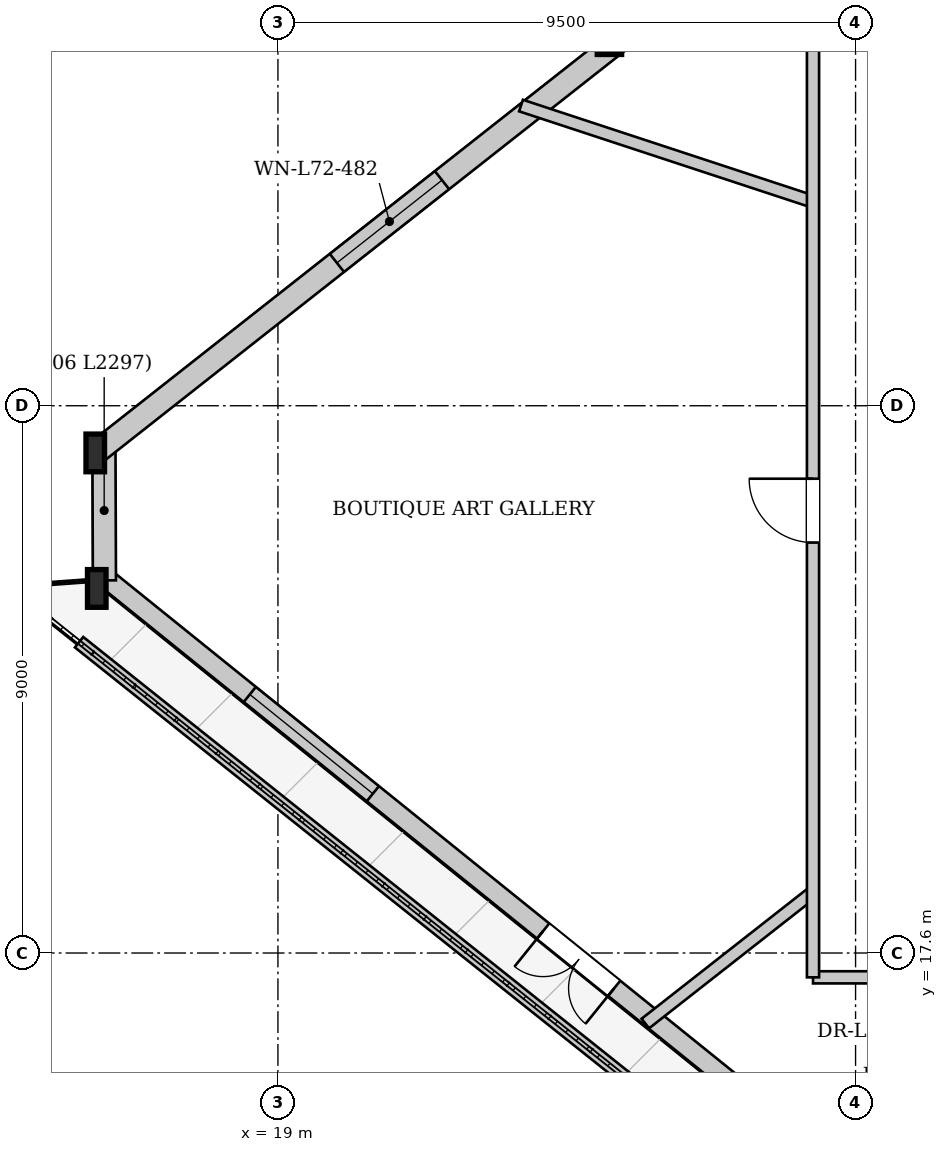
"""IFC4 building model, lengths in metres.
Left out: names, types, materials, properties, quantities, classifications, styles, units other than length and angle.
Written with IfcOpenShell. Run it as: python <this file> out.ifc"""

import sys

from ifc_helpers import new_model, si_unit, direction, frame, frame_2d, origin, origin_2d, place, context, subcontext, project, spatial, rectangle, i_section, extrude, source, transform, mapped, element, fill, save


model = new_model("IFC4")
c1 = context("Model", 3, precision=1e-05, world=origin(), true_north=direction((0.0, 1.0)))
c2 = subcontext(c1, "Body", "Model", "MODEL_VIEW")
j1 = project(units=[si_unit("LENGTHUNIT", "METRE"), si_unit("PLANEANGLEUNIT", "RADIAN")], contexts=[c1])
p1 = place(None, origin())
s1 = spatial("IfcSite", under=j1, at=p1, CompositionType="ELEMENT")
p2 = place(p1, origin())
s2 = spatial("IfcBuilding", under=s1, at=p2, CompositionType="ELEMENT")
p3 = place(p2, frame((0.0, 0.0, 270.5)))
s3 = spatial("IfcBuildingStorey", under=s2, at=p3, CompositionType="ELEMENT", Elevation=270.5)
m1 = source(origin(), c2, "Body", "SweptSolid", [
    extrude(i_section(OverallWidth=0.401, OverallDepth=0.399, WebThickness=0.022, FlangeThickness=0.034, at=origin_2d()), origin(), (0.0, 0.0, 1.0), 3.449),
])
p4 = place(p3, frame((24.463, 32.729, 0.0), z_axis=(-0.006371364078, -0.088491167751, 0.996056584211), x_axis=(0.997418034357, -0.071814098474, 0.0)))
e1 = element("IfcColumn", 1, at=p4, inside=s3, PredefinedType="COLUMN", context=c2, shape_type="MappedRepresentation", body=[
    mapped(m1, transform((0.0, 0.0, 0.0), x_axis=(1.0, 0.0, 0.0), y_axis=(0.0, 1.0, 0.0), z_axis=(0.0, 0.0, 1.0), scale=1.0)),
])
m2 = source(origin(), c2, "Body", "SweptSolid", [
    extrude(i_section(OverallWidth=0.305, OverallDepth=0.62, WebThickness=0.021, FlangeThickness=0.04, at=origin_2d()), origin(), (0.0, 0.0, 1.0), 3.459),
])
p5 = place(p3, frame((15.948, 26.024, 0.0), z_axis=(0.027310398688, -0.115663419766, 0.992912944548), x_axis=(0.973237757323, 0.229800495475, 0.0)))
e2 = element("IfcColumn", 2, at=p5, inside=s3, PredefinedType="COLUMN", context=c2, shape_type="MappedRepresentation", body=[
    mapped(m2, transform((0.0, 0.0, 0.0), x_axis=(1.0, 0.0, 0.0), y_axis=(0.0, 1.0, 0.0), z_axis=(0.0, 0.0, 1.0), scale=1.0)),
])
m3 = source(origin(), c2, "Body", "SweptSolid", [
    extrude(i_section(OverallWidth=0.305, OverallDepth=0.62, WebThickness=0.021, FlangeThickness=0.04, at=origin_2d()), origin(), (0.0, 0.0, 1.0), 3.448),
])
p6 = place(p3, frame((15.956, 23.727, 0.0), z_axis=(0.037178471964, -0.076410611903, 0.996383048637), x_axis=(0.899208505814, 0.437520357324, 0.0)))
e3 = element("IfcColumn", 3, at=p6, inside=s3, PredefinedType="COLUMN", context=c2, shape_type="MappedRepresentation", body=[
    mapped(m3, transform((0.0, 0.0, 0.0), x_axis=(1.0, 0.0, 0.0), y_axis=(0.0, 1.0, 0.0), z_axis=(0.0, 0.0, 1.0), scale=1.0)),
])
p7 = place(p3, frame((29.49, 13.021, 0.0), z_axis=(0.0, 0.0, 1.0), x_axis=(-0.778476594197, 0.627673635169, 0.0)))
e4 = element("IfcWall", 4, at=p7, inside=s3, PredefinedType="SOLIDWALL", context=c2, shape_type="SweptSolid", body=[
    extrude(rectangle(XDim=17.256, YDim=0.32, at=frame_2d((8.628, 0.0))), origin(), (0.0, 0.0, 1.0), 2.872),
])
p8 = place(p7, frame((6.372, 0.0, 0.0)))
e5 = element("IfcOpeningElement", 5, at=p8, cuts=e4, PredefinedType="OPENING", context=c2, shape_type="SweptSolid", body=[
    extrude(rectangle(XDim=1.5, YDim=2.3, at=frame_2d((0.75, 1.15))), frame((0.0, 0.17, 0.0), z_axis=(0.0, -1.0, 0.0), x_axis=(1.0, 0.0, 0.0)), (0.0, 0.0, 1.0), 0.34),
])
p9 = place(p7, frame((11.47, 0.0, 0.402)))
e6 = element("IfcOpeningElement", 6, at=p9, cuts=e4, PredefinedType="OPENING", context=c2, shape_type="SweptSolid", body=[
    extrude(rectangle(XDim=2.6, YDim=2.35, at=frame_2d((1.3, 1.175))), frame((0.0, 0.17, 0.0), z_axis=(0.0, -1.0, 0.0), x_axis=(1.0, 0.0, 0.0)), (0.0, 0.0, 1.0), 0.34),
])
p10 = place(p3, frame((16.146, 23.728, 0.0), z_axis=(0.0, 0.0, 1.0), x_axis=(-0.003507631483, 0.999993848242, 0.0)))
e7 = element("IfcWall", 7, at=p10, inside=s3, PredefinedType="SOLIDWALL", context=c2, shape_type="SweptSolid", body=[
    extrude(rectangle(XDim=2.297, YDim=0.38, at=frame_2d((1.148, 0.0))), origin(), (0.0, 0.0, 1.0), 2.872),
])
p11 = place(p3, frame((16.066, 25.875, 0.0), z_axis=(0.0, 0.0, 1.0), x_axis=(0.785693730349, 0.61861568206, 0.0)))
e8 = element("IfcWall", 8, at=p11, inside=s3, PredefinedType="SOLIDWALL", context=c2, shape_type="SweptSolid", body=[
    extrude(rectangle(XDim=21.675, YDim=0.38, at=frame_2d((10.837, 0.0))), origin(), (0.0, 0.0, 1.0), 2.872),
])
p12 = place(p11, frame((4.969, 0.0, 0.502)))
e9 = element("IfcOpeningElement", 9, at=p12, cuts=e8, PredefinedType="OPENING", context=c2, shape_type="SweptSolid", body=[
    extrude(rectangle(XDim=2.2, YDim=2.25, at=frame_2d((1.1, 1.125))), frame((0.0, 0.2, 0.0), z_axis=(0.0, -1.0, 0.0), x_axis=(1.0, 0.0, 0.0)), (0.0, 0.0, 1.0), 0.4),
])
p13 = place(p11, frame((17.506, 0.0, 0.502)))
e10 = element("IfcOpeningElement", 10, at=p13, cuts=e8, PredefinedType="OPENING", context=c2, shape_type="SweptSolid", body=[
    extrude(rectangle(XDim=2.2, YDim=2.25, at=frame_2d((1.1, 1.125))), frame((0.0, 0.2, 0.0), z_axis=(0.0, -1.0, 0.0), x_axis=(1.0, 0.0, 0.0)), (0.0, 0.0, 1.0), 0.4),
])
p14 = place(p3, frame((15.729, 22.711, 0.0), z_axis=(0.0, 0.0, 1.0), x_axis=(0.781937578539, -0.623356738368, 0.0)))
e11 = element("IfcWall", 11, at=p14, inside=s3, PredefinedType="PARAPET", context=c2, shape_type="SweptSolid", body=[
    extrude(rectangle(XDim=15.428, YDim=0.22, at=frame_2d((7.714, 0.0))), origin(), (0.0, 0.0, 1.0), 0.3),
])
p15 = place(p3, frame((27.8, 29.956, 0.0), z_axis=(0.0, 0.0, 1.0), x_axis=(-0.949893157057, 0.312574775336, 0.0)))
e12 = element("IfcWall", 12, at=p15, inside=s3, PredefinedType="PARTITIONING", context=c2, shape_type="SweptSolid", body=[
    extrude(rectangle(XDim=5.056, YDim=0.2, at=frame_2d((2.528, 0.0))), origin(), (0.0, 0.0, 1.0), 3.38),
])
p16 = place(p3, frame((27.8, 18.603, 0.0), z_axis=(0.0, 0.0, 1.0), x_axis=(-0.786941631294, -0.617027445854, 0.0)))
e13 = element("IfcWall", 13, at=p16, inside=s3, PredefinedType="PARTITIONING", context=c2, shape_type="SweptSolid", body=[
    extrude(rectangle(XDim=3.504, YDim=0.2, at=frame_2d((1.752, 0.0))), origin(), (0.0, 0.0, 1.0), 3.38),
])
p17 = place(p3, frame((27.8, 17.2, 0.0), z_axis=(0.0, 0.0, 1.0), x_axis=(1.0, 0.0, 0.0)))
e14 = element("IfcWall", 14, at=p17, inside=s3, PredefinedType="PARTITIONING", context=c2, shape_type="SweptSolid", body=[
    extrude(rectangle(XDim=20.4, YDim=0.2, at=frame_2d((10.2, 0.0))), origin(), (0.0, 0.0, 1.0), 3.38),
])
p18 = place(p17, frame((14.378, 0.0, 0.0)))
e15 = element("IfcOpeningElement", 15, at=p18, cuts=e14, PredefinedType="OPENING", context=c2, shape_type="SweptSolid", body=[
    extrude(rectangle(XDim=1.05, YDim=2.2, at=frame_2d((0.525, 1.1))), frame((0.0, 0.11, 0.0), z_axis=(0.0, -1.0, 0.0), x_axis=(1.0, 0.0, 0.0)), (0.0, 0.0, 1.0), 0.22),
])
p19 = place(p17, frame((19.05, 0.0, 0.0)))
e16 = element("IfcOpeningElement", 16, at=p19, cuts=e14, PredefinedType="OPENING", context=c2, shape_type="SweptSolid", body=[
    extrude(rectangle(XDim=1.05, YDim=2.2, at=frame_2d((0.525, 1.1))), frame((0.0, 0.11, 0.0), z_axis=(0.0, -1.0, 0.0), x_axis=(1.0, 0.0, 0.0)), (0.0, 0.0, 1.0), 0.22),
])
p20 = place(p17, frame((1.241, 0.0, 0.0)))
e17 = element("IfcOpeningElement", 17, at=p20, cuts=e14, PredefinedType="OPENING", context=c2, shape_type="SweptSolid", body=[
    extrude(rectangle(XDim=1.05, YDim=2.2, at=frame_2d((0.525, 1.1))), frame((0.0, 0.11, 0.0), z_axis=(0.0, -1.0, 0.0), x_axis=(1.0, 0.0, 0.0)), (0.0, 0.0, 1.0), 0.22),
])
p21 = place(p3, frame((27.8, 17.2, 0.0), z_axis=(0.0, 0.0, 1.0), x_axis=(0.0, 1.0, 0.0)))
e18 = element("IfcWall", 18, at=p21, inside=s3, PredefinedType="PARTITIONING", context=c2, shape_type="SweptSolid", body=[
    extrude(rectangle(XDim=18.118, YDim=0.2, at=frame_2d((9.059, 0.0))), origin(), (0.0, 0.0, 1.0), 3.38),
])
p22 = place(p21, frame((7.15, 0.0, 0.0)))
e19 = element("IfcOpeningElement", 19, at=p22, cuts=e18, PredefinedType="OPENING", context=c2, shape_type="SweptSolid", body=[
    extrude(rectangle(XDim=1.05, YDim=2.2, at=frame_2d((0.525, 1.1))), frame((0.0, 0.11, 0.0), z_axis=(0.0, -1.0, 0.0), x_axis=(1.0, 0.0, 0.0)), (0.0, 0.0, 1.0), 0.22),
])
m4 = source(origin(), c2, "Body", "SweptSolid", [
    extrude(rectangle(XDim=1.5, YDim=2.3, at=frame_2d((0.75, 1.15))), frame((0.0, 0.025, 0.0), z_axis=(0.0, -1.0, 0.0), x_axis=(1.0, 0.0, 0.0)), (0.0, 0.0, 1.0), 0.05),
])
p23 = place(p8, origin())
e20 = element("IfcDoor", 20, at=p23, inside=s3, OperationType="DOUBLE_DOOR_SINGLE_SWING", PredefinedType="DOOR", context=c2, shape_type="MappedRepresentation", body=[
    mapped(m4, transform((0.0, 0.0, 0.0), x_axis=(1.0, 0.0, 0.0), y_axis=(0.0, 1.0, 0.0), z_axis=(0.0, 0.0, 1.0), scale=1.0)),
])
fill(e5, e20)
m5 = source(origin(), c2, "Body", "SweptSolid", [
    extrude(rectangle(XDim=2.6, YDim=2.35, at=frame_2d((1.3, 1.175))), frame((0.0, 0.03, 0.0), z_axis=(0.0, -1.0, 0.0), x_axis=(1.0, 0.0, 0.0)), (0.0, 0.0, 1.0), 0.06),
])
p24 = place(p9, origin())
e21 = element("IfcWindow", 21, at=p24, inside=s3, PartitioningType="SINGLE_PANEL", PredefinedType="WINDOW", context=c2, shape_type="MappedRepresentation", body=[
    mapped(m5, transform((0.0, 0.0, 0.0), x_axis=(1.0, 0.0, 0.0), y_axis=(0.0, 1.0, 0.0), z_axis=(0.0, 0.0, 1.0), scale=1.0)),
])
fill(e6, e21)
m6 = source(origin(), c2, "Body", "SweptSolid", [
    extrude(rectangle(XDim=2.2, YDim=2.25, at=frame_2d((1.1, 1.125))), frame((0.0, 0.03, 0.0), z_axis=(0.0, -1.0, 0.0), x_axis=(1.0, 0.0, 0.0)), (0.0, 0.0, 1.0), 0.06),
])
p25 = place(p12, origin())
e22 = element("IfcWindow", 22, at=p25, inside=s3, PartitioningType="SINGLE_PANEL", PredefinedType="WINDOW", context=c2, shape_type="MappedRepresentation", body=[
    mapped(m6, transform((0.0, 0.0, 0.0), x_axis=(1.0, 0.0, 0.0), y_axis=(0.0, 1.0, 0.0), z_axis=(0.0, 0.0, 1.0), scale=1.0)),
])
fill(e9, e22)
m7 = source(origin(), c2, "Body", "SweptSolid", [
    extrude(rectangle(XDim=1.05, YDim=2.2, at=frame_2d((0.525, 1.1))), frame((0.0, 0.025, 0.0), z_axis=(0.0, -1.0, 0.0), x_axis=(1.0, 0.0, 0.0)), (0.0, 0.0, 1.0), 0.05),
])
p26 = place(p22, origin())
e23 = element("IfcDoor", 23, at=p26, inside=s3, OperationType="SINGLE_SWING_RIGHT", PredefinedType="DOOR", context=c2, shape_type="MappedRepresentation", body=[
    mapped(m7, transform((0.0, 0.0, 0.0), x_axis=(1.0, 0.0, 0.0), y_axis=(0.0, 1.0, 0.0), z_axis=(0.0, 0.0, 1.0), scale=1.0)),
])
fill(e19, e23)
save(model, sys.argv[1])
